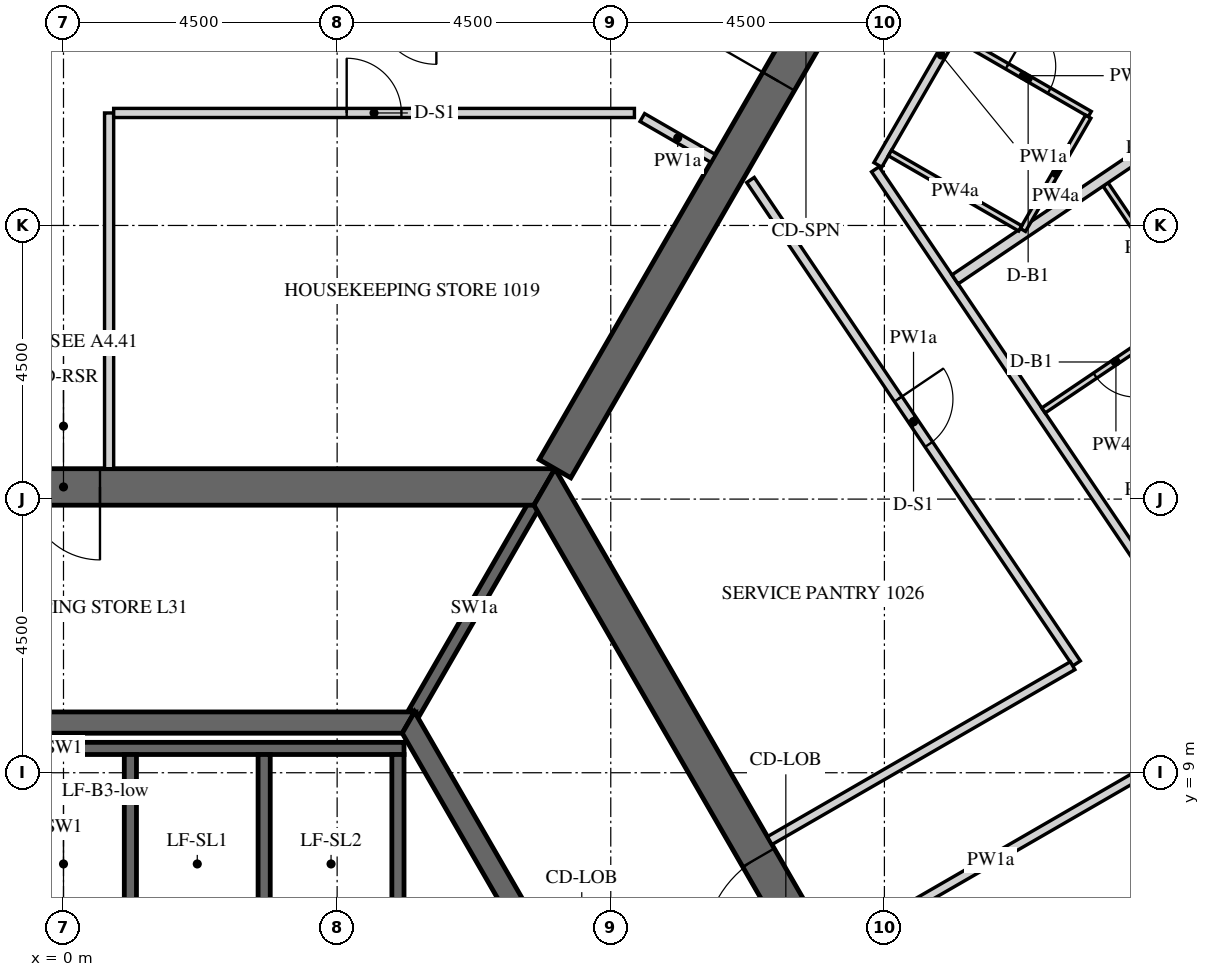
"""IFC4 building model, lengths in metres.
Left out: names, types, materials, properties, quantities, classifications, styles, units other than length and angle.
Written with IfcOpenShell. Run it as: python <this file> out.ifc"""

import sys

from ifc_helpers import new_model, si_unit, direction, frame, frame_2d, origin, place, context, subcontext, project, spatial, polyline, rectangle, outline, extrude, element, fill, save


model = new_model("IFC4")
c1 = context("Model", 3, precision=1e-05, world=origin(), true_north=direction((0.0, 1.0)))
c2 = subcontext(c1, "Body", "Model", "MODEL_VIEW")
j1 = project(units=[si_unit("LENGTHUNIT", "METRE"), si_unit("PLANEANGLEUNIT", "RADIAN")], contexts=[c1])
p1 = place(None, origin())
s1 = spatial("IfcSite", under=j1, at=p1, CompositionType="ELEMENT")
p2 = place(p1, origin())
s2 = spatial("IfcBuilding", under=s1, at=p2, CompositionType="ELEMENT")
p3 = place(p2, frame((0.0, 0.0, 135.0)))
s3 = spatial("IfcBuildingStorey", under=s2, at=p3, CompositionType="ELEMENT", Elevation=135.0)
p4 = place(p3, frame((33.728, 3.153, -0.15), z_axis=(0.0, 0.0, 1.0), x_axis=(-0.559192411416, 0.82903790445, 0.0)))
e1 = element("IfcWall", 1, at=p4, inside=s3, PredefinedType="SOLIDWALL", context=c2, shape_type="SweptSolid", body=[
    extrude(outline(polyline([(-0.026, -0.275), (30.093, -0.275), (30.048, 0.275), (0.026, 0.275), (-0.026, -0.275)])), origin(), (0.0, 0.0, 1.0), 3.9),
])
p5 = place(p4, frame((1.236, 0.0, 1.05)))
e2 = element("IfcOpeningElement", 2, at=p5, cuts=e1, PredefinedType="OPENING", context=c2, shape_type="SweptSolid", body=[
    extrude(rectangle(XDim=2.4, YDim=2.4, at=frame_2d((1.2, 1.2))), frame((0.0, 0.285, 0.0), z_axis=(0.0, -1.0, 0.0), x_axis=(1.0, 0.0, 0.0)), (0.0, 0.0, 1.0), 0.57),
])
p6 = place(p4, frame((4.835, 0.0, 1.05)))
e3 = element("IfcOpeningElement", 3, at=p6, cuts=e1, PredefinedType="OPENING", context=c2, shape_type="SweptSolid", body=[
    extrude(rectangle(XDim=2.4, YDim=2.4, at=frame_2d((1.2, 1.2))), frame((0.0, 0.285, 0.0), z_axis=(0.0, -1.0, 0.0), x_axis=(1.0, 0.0, 0.0)), (0.0, 0.0, 1.0), 0.57),
])
p7 = place(p4, frame((8.436, 0.0, 1.05)))
e4 = element("IfcOpeningElement", 4, at=p7, cuts=e1, PredefinedType="OPENING", context=c2, shape_type="SweptSolid", body=[
    extrude(rectangle(XDim=2.4, YDim=2.4, at=frame_2d((1.2, 1.2))), frame((0.0, 0.285, 0.0), z_axis=(0.0, -1.0, 0.0), x_axis=(1.0, 0.0, 0.0)), (0.0, 0.0, 1.0), 0.57),
])
p8 = place(p4, frame((12.035, 0.0, 1.05)))
e5 = element("IfcOpeningElement", 5, at=p8, cuts=e1, PredefinedType="OPENING", context=c2, shape_type="SweptSolid", body=[
    extrude(rectangle(XDim=2.4, YDim=2.4, at=frame_2d((1.2, 1.2))), frame((0.0, 0.285, 0.0), z_axis=(0.0, -1.0, 0.0), x_axis=(1.0, 0.0, 0.0)), (0.0, 0.0, 1.0), 0.57),
])
p9 = place(p4, frame((15.635, 0.0, 1.05)))
e6 = element("IfcOpeningElement", 6, at=p9, cuts=e1, PredefinedType="OPENING", context=c2, shape_type="SweptSolid", body=[
    extrude(rectangle(XDim=2.4, YDim=2.4, at=frame_2d((1.2, 1.2))), frame((0.0, 0.285, 0.0), z_axis=(0.0, -1.0, 0.0), x_axis=(1.0, 0.0, 0.0)), (0.0, 0.0, 1.0), 0.57),
])
p10 = place(p4, frame((19.236, 0.0, 1.05)))
e7 = element("IfcOpeningElement", 7, at=p10, cuts=e1, PredefinedType="OPENING", context=c2, shape_type="SweptSolid", body=[
    extrude(rectangle(XDim=2.4, YDim=2.4, at=frame_2d((1.2, 1.2))), frame((0.0, 0.285, 0.0), z_axis=(0.0, -1.0, 0.0), x_axis=(1.0, 0.0, 0.0)), (0.0, 0.0, 1.0), 0.57),
])
p11 = place(p4, frame((22.835, 0.0, 1.05)))
e8 = element("IfcOpeningElement", 8, at=p11, cuts=e1, PredefinedType="OPENING", context=c2, shape_type="SweptSolid", body=[
    extrude(rectangle(XDim=2.4, YDim=2.4, at=frame_2d((1.2, 1.2))), frame((0.0, 0.285, 0.0), z_axis=(0.0, -1.0, 0.0), x_axis=(1.0, 0.0, 0.0)), (0.0, 0.0, 1.0), 0.57),
])
p12 = place(p4, frame((26.436, 0.0, 1.05)))
e9 = element("IfcOpeningElement", 9, at=p12, cuts=e1, PredefinedType="OPENING", context=c2, shape_type="SweptSolid", body=[
    extrude(rectangle(XDim=2.4, YDim=2.4, at=frame_2d((1.2, 1.2))), frame((0.0, 0.285, 0.0), z_axis=(0.0, -1.0, 0.0), x_axis=(1.0, 0.0, 0.0)), (0.0, 0.0, 1.0), 0.57),
])
p13 = place(p3, frame((15.819, 0.0, -0.15), z_axis=(0.0, 0.0, 1.0), x_axis=(-0.499999880136, 0.866025472988, 0.0)))
e10 = element("IfcWall", 10, at=p13, inside=s3, PredefinedType="SHEAR", context=c2, shape_type="SweptSolid", body=[
    extrude(outline(polyline([(-0.173, -0.3), (15.993, -0.3), (15.646, 0.3), (0.173, 0.3), (-0.173, -0.3)])), origin(), (0.0, 0.0, 1.0), 3.9),
])
p14 = place(p13, frame((6.981, 0.0, 0.15)))
e11 = element("IfcOpeningElement", 11, at=p14, cuts=e10, PredefinedType="OPENING", context=c2, shape_type="SweptSolid", body=[
    extrude(rectangle(XDim=1.8, YDim=2.4, at=frame_2d((0.9, 1.2))), frame((0.0, 0.31, 0.0), z_axis=(0.0, -1.0, 0.0), x_axis=(1.0, 0.0, 0.0)), (0.0, 0.0, 1.0), 0.62),
])
p15 = place(p3, frame((7.91, 13.7, -0.15), z_axis=(0.0, 0.0, 1.0), x_axis=(-1.0, 0.0, 0.0)))
e12 = element("IfcWall", 12, at=p15, inside=s3, PredefinedType="SHEAR", context=c2, shape_type="SweptSolid", body=[
    extrude(outline(polyline([(-0.173, -0.3), (15.993, -0.3), (15.646, 0.3), (0.173, 0.3), (-0.173, -0.3)])), origin(), (0.0, 0.0, 1.0), 3.9),
])
p16 = place(p15, frame((7.31, 0.0, 0.15)))
e13 = element("IfcOpeningElement", 13, at=p16, cuts=e12, PredefinedType="OPENING", context=c2, shape_type="SweptSolid", body=[
    extrude(rectangle(XDim=1.2, YDim=2.4, at=frame_2d((0.6, 1.2))), frame((0.0, 0.31, 0.0), z_axis=(0.0, -1.0, 0.0), x_axis=(1.0, 0.0, 0.0)), (0.0, 0.0, 1.0), 0.62),
])
p17 = place(p3, frame((8.083, 14.0, -0.15), z_axis=(0.0, 0.0, 1.0), x_axis=(0.499997680643, 0.866026742862, 0.0)))
e14 = element("IfcWall", 14, at=p17, inside=s3, PredefinedType="SHEAR", context=c2, shape_type="SweptSolid", body=[
    extrude(rectangle(XDim=16.509, YDim=0.6, at=frame_2d((8.254, 0.0))), origin(), (0.0, 0.0, 1.0), 3.9),
])
p18 = place(p17, frame((7.354, 0.0, 0.15)))
e15 = element("IfcOpeningElement", 15, at=p18, cuts=e14, PredefinedType="OPENING", context=c2, shape_type="SweptSolid", body=[
    extrude(rectangle(XDim=1.8, YDim=2.4, at=frame_2d((0.9, 1.2))), frame((0.0, 0.31, 0.0), z_axis=(0.0, -1.0, 0.0), x_axis=(1.0, 0.0, 0.0)), (0.0, 0.0, 1.0), 0.62),
])
p19 = place(p3, frame((11.345, 0.0, -0.15), z_axis=(0.0, 0.0, 1.0), x_axis=(-0.499995046907, 0.866028263435, 0.0)))
e16 = element("IfcWall", 16, at=p19, inside=s3, PredefinedType="SHEAR", context=c2, shape_type="SweptSolid", body=[
    extrude(outline(polyline([(-0.101, -0.175), (11.446, -0.175), (11.244, 0.175), (0.101, 0.175), (-0.101, -0.175)])), origin(), (0.0, 0.0, 1.0), 3.9),
])
p20 = place(p19, frame((4.744, 0.0, 0.15)))
e17 = element("IfcOpeningElement", 17, at=p20, cuts=e16, PredefinedType="OPENING", context=c2, shape_type="SweptSolid", body=[
    extrude(rectangle(XDim=1.8, YDim=2.4, at=frame_2d((0.9, 1.2))), frame((0.0, 0.185, 0.0), z_axis=(0.0, -1.0, 0.0), x_axis=(1.0, 0.0, 0.0)), (0.0, 0.0, 1.0), 0.37),
])
p21 = place(p3, frame((5.673, 9.825, -0.15), z_axis=(0.0, 0.0, 1.0), x_axis=(-1.0, 0.0, 0.0)))
e18 = element("IfcWall", 18, at=p21, inside=s3, PredefinedType="SHEAR", context=c2, shape_type="SweptSolid", body=[
    extrude(outline(polyline([(-0.101, -0.175), (11.446, -0.175), (11.244, 0.175), (0.101, 0.175), (-0.101, -0.175)])), origin(), (0.0, 0.0, 1.0), 3.9),
])
p22 = place(p3, frame((-5.6, 9.4, -0.25), z_axis=(0.0, 0.0, 1.0), x_axis=(1.0, 0.0, 0.0)))
e19 = element("IfcWall", 19, at=p22, inside=s3, PredefinedType="SHEAR", context=c2, shape_type="SweptSolid", body=[
    extrude(rectangle(XDim=11.2, YDim=0.2, at=frame_2d((5.6, 0.0))), origin(), (0.0, 0.0, 1.0), 3.9),
])
for number, where, z_axis, x_axis in (
    (20, (1.1, 6.4, -0.25), (0.0, 0.0, 1.0), (0.0, 1.0, 0.0)),
    (21, (3.3, 6.4, -0.25), (0.0, 0.0, 1.0), (0.0, 1.0, 0.0)),
    (22, (5.5, 6.4, -0.25), (0.0, 0.0, 1.0), (0.0, 1.0, 0.0)),
):
    element("IfcWall", number, at=place(p3, frame(where, z_axis=z_axis, x_axis=x_axis)), inside=s3, PredefinedType="SHEAR", context=c2, shape_type="SweptSolid", body=[
        extrude(rectangle(XDim=2.9, YDim=0.2, at=frame_2d((1.45, 0.0))), origin(), (0.0, 0.0, 1.0), 3.9),
    ])
p23 = place(p3, frame((5.773, 10.0, -0.15), z_axis=(0.0, 0.0, 1.0), x_axis=(0.500038251005, 0.86600331843, 0.0)))
e23 = element("IfcWall", 23, at=p23, inside=s3, PredefinedType="SHEAR", context=c2, shape_type="SweptSolid", body=[
    extrude(rectangle(XDim=3.926, YDim=0.2, at=frame_2d((1.963, 0.0))), origin(), (0.0, 0.0, 1.0), 3.9),
])
p24 = place(p3, frame((0.75, 14.0, 0.0), z_axis=(0.0, 0.0, 1.0), x_axis=(0.0, 1.0, 0.0)))
e24 = element("IfcWall", 24, at=p24, inside=s3, PredefinedType="PARTITIONING", context=c2, shape_type="SweptSolid", body=[
    extrude(rectangle(XDim=5.85, YDim=0.15, at=frame_2d((2.925, 0.0))), origin(), (0.0, 0.0, 1.0), 2.838),
])
p25 = place(p3, frame((0.825, 19.85, 0.0), z_axis=(0.0, 0.0, 1.0), x_axis=(1.0, 0.0, 0.0)))
e25 = element("IfcWall", 25, at=p25, inside=s3, PredefinedType="PARTITIONING", context=c2, shape_type="SweptSolid", body=[
    extrude(rectangle(XDim=8.564, YDim=0.15, at=frame_2d((4.282, 0.0))), origin(), (0.0, 0.0, 1.0), 2.838),
])
p26 = place(p25, frame((3.832, 0.0, 0.0)))
e26 = element("IfcOpeningElement", 26, at=p26, cuts=e25, PredefinedType="OPENING", context=c2, shape_type="SweptSolid", body=[
    extrude(rectangle(XDim=0.9, YDim=2.1, at=frame_2d((0.45, 1.05))), frame((0.0, 0.085, 0.0), z_axis=(0.0, -1.0, 0.0), x_axis=(1.0, 0.0, 0.0)), (0.0, 0.0, 1.0), 0.17),
])
p27 = place(p3, frame((9.519, 19.775, 0.0), z_axis=(0.0, 0.0, 1.0), x_axis=(0.866043397086, -0.499968833392, 0.0)))
e27 = element("IfcWall", 27, at=p27, inside=s3, PredefinedType="PARTITIONING", context=c2, shape_type="SweptSolid", body=[
    extrude(rectangle(XDim=1.344, YDim=0.15, at=frame_2d((0.672, 0.0))), origin(), (0.0, 0.0, 1.0), 2.838),
])
p28 = place(p3, frame((25.467, 0.96, 0.0), z_axis=(0.0, 0.0, 1.0), x_axis=(-0.559200743185, 0.829032284547, 0.0)))
e28 = element("IfcWall", 28, at=p28, inside=s3, PredefinedType="PARTITIONING", context=c2, shape_type="SweptSolid", body=[
    extrude(rectangle(XDim=21.668, YDim=0.15, at=frame_2d((10.834, 0.0))), origin(), (0.0, 0.0, 1.0), 2.838),
])
p29 = place(p28, frame((10.434, 0.0, 0.0)))
e29 = element("IfcOpeningElement", 29, at=p29, cuts=e28, PredefinedType="OPENING", context=c2, shape_type="SweptSolid", body=[
    extrude(rectangle(XDim=1.0, YDim=2.1, at=frame_2d((0.5, 1.05))), frame((0.0, 0.085, 0.0), z_axis=(0.0, -1.0, 0.0), x_axis=(1.0, 0.0, 0.0)), (0.0, 0.0, 1.0), 0.17),
])
p30 = place(p3, frame((13.392, 18.996, 0.0), z_axis=(0.0, 0.0, 1.0), x_axis=(0.499995902753, 0.866027769318, 0.0)))
e30 = element("IfcWall", 30, at=p30, inside=s3, PredefinedType="PARTITIONING", context=c2, shape_type="SweptSolid", body=[
    extrude(rectangle(XDim=4.173, YDim=0.15, at=frame_2d((2.087, 0.0))), origin(), (0.0, 0.0, 1.0), 2.838),
])
p31 = place(p30, frame((2.645, 0.0, 0.0)))
e31 = element("IfcOpeningElement", 31, at=p31, cuts=e30, PredefinedType="OPENING", context=c2, shape_type="SweptSolid", body=[
    extrude(rectangle(XDim=1.0, YDim=2.1, at=frame_2d((0.5, 1.05))), frame((0.0, 0.085, 0.0), z_axis=(0.0, -1.0, 0.0), x_axis=(1.0, 0.0, 0.0)), (0.0, 0.0, 1.0), 0.17),
])
p32 = place(p3, frame((12.664, 6.066, 0.0), z_axis=(0.0, 0.0, 1.0), x_axis=(0.866018848283, 0.500011354289, 0.0)))
e32 = element("IfcWall", 32, at=p32, inside=s3, PredefinedType="PARTITIONING", context=c2, shape_type="SweptSolid", body=[
    extrude(rectangle(XDim=5.974, YDim=0.15, at=frame_2d((2.987, 0.0))), origin(), (0.0, 0.0, 1.0), 2.838),
])
p33 = place(p3, frame((11.298, 18.748, 0.0), z_axis=(0.0, 0.0, 1.0), x_axis=(0.559198234291, -0.829033976847, 0.0)))
e33 = element("IfcWall", 33, at=p33, inside=s3, PredefinedType="PARTITIONING", context=c2, shape_type="SweptSolid", body=[
    extrude(rectangle(XDim=9.59, YDim=0.15, at=frame_2d((4.795, 0.0))), origin(), (0.0, 0.0, 1.0), 2.838),
])
p34 = place(p33, frame((4.345, 0.0, 0.0)))
e34 = element("IfcOpeningElement", 34, at=p34, cuts=e33, PredefinedType="OPENING", context=c2, shape_type="SweptSolid", body=[
    extrude(rectangle(XDim=0.9, YDim=2.1, at=frame_2d((0.45, 1.05))), frame((0.0, 0.085, 0.0), z_axis=(0.0, -1.0, 0.0), x_axis=(1.0, 0.0, 0.0)), (0.0, 0.0, 1.0), 0.17),
])
p35 = place(p3, frame((16.595, 10.76, 0.0), z_axis=(0.0, 0.0, 1.0), x_axis=(-0.866019477104, -0.500010265171, 0.0)))
e35 = element("IfcWall", 35, at=p35, inside=s3, PredefinedType="PARTITIONING", context=c2, shape_type="SweptSolid", body=[
    extrude(rectangle(XDim=5.752, YDim=0.15, at=frame_2d((2.876, 0.0))), origin(), (0.0, 0.0, 1.0), 2.838),
])
p36 = place(p3, frame((17.137, 18.675, 0.0), z_axis=(0.0, 0.0, 1.0), x_axis=(0.559203861497, -0.829030181168, 0.0)))
e36 = element("IfcWall", 36, at=p36, inside=s3, PredefinedType="PARTITIONING", context=c2, shape_type="SweptSolid", body=[
    extrude(rectangle(XDim=2.51, YDim=0.1, at=frame_2d((1.255, 0.0))), origin(), (0.0, 0.0, 1.0), 2.838),
])
p37 = place(p3, frame((18.499, 16.566, 0.0), z_axis=(0.0, 0.0, 1.0), x_axis=(-0.82904649496, -0.559179675234, 0.0)))
e37 = element("IfcWall", 37, at=p37, inside=s3, PredefinedType="PARTITIONING", context=c2, shape_type="SweptSolid", body=[
    extrude(rectangle(XDim=2.875, YDim=0.1, at=frame_2d((1.438, 0.0))), origin(), (0.0, 0.0, 1.0), 2.838),
])
p38 = place(p37, frame((1.05, 0.0, 0.0)))
e38 = element("IfcOpeningElement", 38, at=p38, cuts=e37, PredefinedType="OPENING", context=c2, shape_type="SweptSolid", body=[
    extrude(rectangle(XDim=0.8, YDim=2.1, at=frame_2d((0.4, 1.05))), frame((0.0, 0.06, 0.0), z_axis=(0.0, -1.0, 0.0), x_axis=(1.0, 0.0, 0.0)), (0.0, 0.0, 1.0), 0.12),
])
p39 = place(p3, frame((21.066, 21.433, 0.0), z_axis=(0.0, 0.0, 1.0), x_axis=(-0.82903328576, -0.559199258853, 0.0)))
e39 = element("IfcWall", 39, at=p39, inside=s3, PredefinedType="PARTITIONING", context=c2, shape_type="SweptSolid", body=[
    extrude(rectangle(XDim=7.725, YDim=0.18, at=frame_2d((3.863, 0.0))), origin(), (0.0, 0.0, 1.0), 2.838),
])
p40 = place(p3, frame((14.69, 21.094, 0.0), z_axis=(0.0, 0.0, 1.0), x_axis=(0.866039067339, -0.499976333282, 0.0)))
e40 = element("IfcWall", 40, at=p40, inside=s3, PredefinedType="PARTITIONING", context=c2, shape_type="SweptSolid", body=[
    extrude(rectangle(XDim=2.525, YDim=0.1, at=frame_2d((1.262, 0.0))), origin(), (0.0, 0.0, 1.0), 2.838),
])
p41 = place(p40, frame((0.955, 0.0, 0.0)))
e41 = element("IfcOpeningElement", 41, at=p41, cuts=e40, PredefinedType="OPENING", context=c2, shape_type="SweptSolid", body=[
    extrude(rectangle(XDim=0.8, YDim=2.1, at=frame_2d((0.4, 1.05))), frame((0.0, 0.06, 0.0), z_axis=(0.0, -1.0, 0.0), x_axis=(1.0, 0.0, 0.0)), (0.0, 0.0, 1.0), 0.12),
])
p42 = place(p3, frame((16.852, 19.789, 0.0), z_axis=(0.0, 0.0, 1.0), x_axis=(-0.499961633463, -0.866047553582, 0.0)))
e42 = element("IfcWall", 42, at=p42, inside=s3, PredefinedType="PARTITIONING", context=c2, shape_type="SweptSolid", body=[
    extrude(rectangle(XDim=2.15, YDim=0.1, at=frame_2d((1.075, 0.0))), origin(), (0.0, 0.0, 1.0), 2.838),
])
p43 = place(p3, frame((15.734, 17.952, 0.0), z_axis=(0.0, 0.0, 1.0), x_axis=(-0.866031185235, 0.4999899861, 0.0)))
e43 = element("IfcWall", 43, at=p43, inside=s3, PredefinedType="PARTITIONING", context=c2, shape_type="SweptSolid", body=[
    extrude(rectangle(XDim=2.475, YDim=0.1, at=frame_2d((1.238, 0.0))), origin(), (0.0, 0.0, 1.0), 2.838),
])
p44 = place(p14, origin())
e44 = element("IfcDoor", 44, at=p44, inside=s3, OperationType="DOUBLE_DOOR_SINGLE_SWING", PredefinedType="DOOR", context=c2, shape_type="SweptSolid", body=[
    extrude(rectangle(XDim=1.8, YDim=2.4, at=frame_2d((0.9, 1.2))), frame((0.0, 0.025, 0.0), z_axis=(0.0, -1.0, 0.0), x_axis=(1.0, 0.0, 0.0)), (0.0, 0.0, 1.0), 0.05),
])
fill(e11, e44)
p45 = place(p16, origin())
e45 = element("IfcDoor", 45, at=p45, inside=s3, OperationType="SINGLE_SWING_LEFT", PredefinedType="DOOR", context=c2, shape_type="SweptSolid", body=[
    extrude(rectangle(XDim=1.2, YDim=2.4, at=frame_2d((0.6, 1.2))), frame((0.0, 0.025, 0.0), z_axis=(0.0, -1.0, 0.0), x_axis=(1.0, 0.0, 0.0)), (0.0, 0.0, 1.0), 0.05),
])
fill(e13, e45)
p46 = place(p18, origin())
e46 = element("IfcDoor", 46, at=p46, inside=s3, OperationType="DOUBLE_DOOR_SINGLE_SWING", PredefinedType="DOOR", context=c2, shape_type="SweptSolid", body=[
    extrude(rectangle(XDim=1.8, YDim=2.4, at=frame_2d((0.9, 1.2))), frame((0.0, 0.025, 0.0), z_axis=(0.0, -1.0, 0.0), x_axis=(1.0, 0.0, 0.0)), (0.0, 0.0, 1.0), 0.05),
])
fill(e15, e46)
p47 = place(p38, origin())
e47 = element("IfcDoor", 47, at=p47, inside=s3, OperationType="SINGLE_SWING_LEFT", PredefinedType="DOOR", context=c2, shape_type="SweptSolid", body=[
    extrude(rectangle(XDim=0.8, YDim=2.1, at=frame_2d((0.4, 1.05))), frame((0.0, 0.025, 0.0), z_axis=(0.0, -1.0, 0.0), x_axis=(1.0, 0.0, 0.0)), (0.0, 0.0, 1.0), 0.05),
])
fill(e38, e47)
p48 = place(p41, origin())
e48 = element("IfcDoor", 48, at=p48, inside=s3, OperationType="SINGLE_SWING_LEFT", PredefinedType="DOOR", context=c2, shape_type="SweptSolid", body=[
    extrude(rectangle(XDim=0.8, YDim=2.1, at=frame_2d((0.4, 1.05))), frame((0.0, 0.025, 0.0), z_axis=(0.0, -1.0, 0.0), x_axis=(1.0, 0.0, 0.0)), (0.0, 0.0, 1.0), 0.05),
])
fill(e41, e48)
p49 = place(p26, origin())
e49 = element("IfcDoor", 49, at=p49, inside=s3, OperationType="SINGLE_SWING_RIGHT", PredefinedType="DOOR", context=c2, shape_type="SweptSolid", body=[
    extrude(rectangle(XDim=0.9, YDim=2.1, at=frame_2d((0.45, 1.05))), frame((0.0, 0.025, 0.0), z_axis=(0.0, -1.0, 0.0), x_axis=(1.0, 0.0, 0.0)), (0.0, 0.0, 1.0), 0.05),
])
fill(e26, e49)
p50 = place(p34, origin())
e50 = element("IfcDoor", 50, at=p50, inside=s3, OperationType="SINGLE_SWING_RIGHT", PredefinedType="DOOR", context=c2, shape_type="SweptSolid", body=[
    extrude(rectangle(XDim=0.9, YDim=2.1, at=frame_2d((0.45, 1.05))), frame((0.0, 0.025, 0.0), z_axis=(0.0, -1.0, 0.0), x_axis=(1.0, 0.0, 0.0)), (0.0, 0.0, 1.0), 0.05),
])
fill(e34, e50)
save(model, sys.argv[1])
